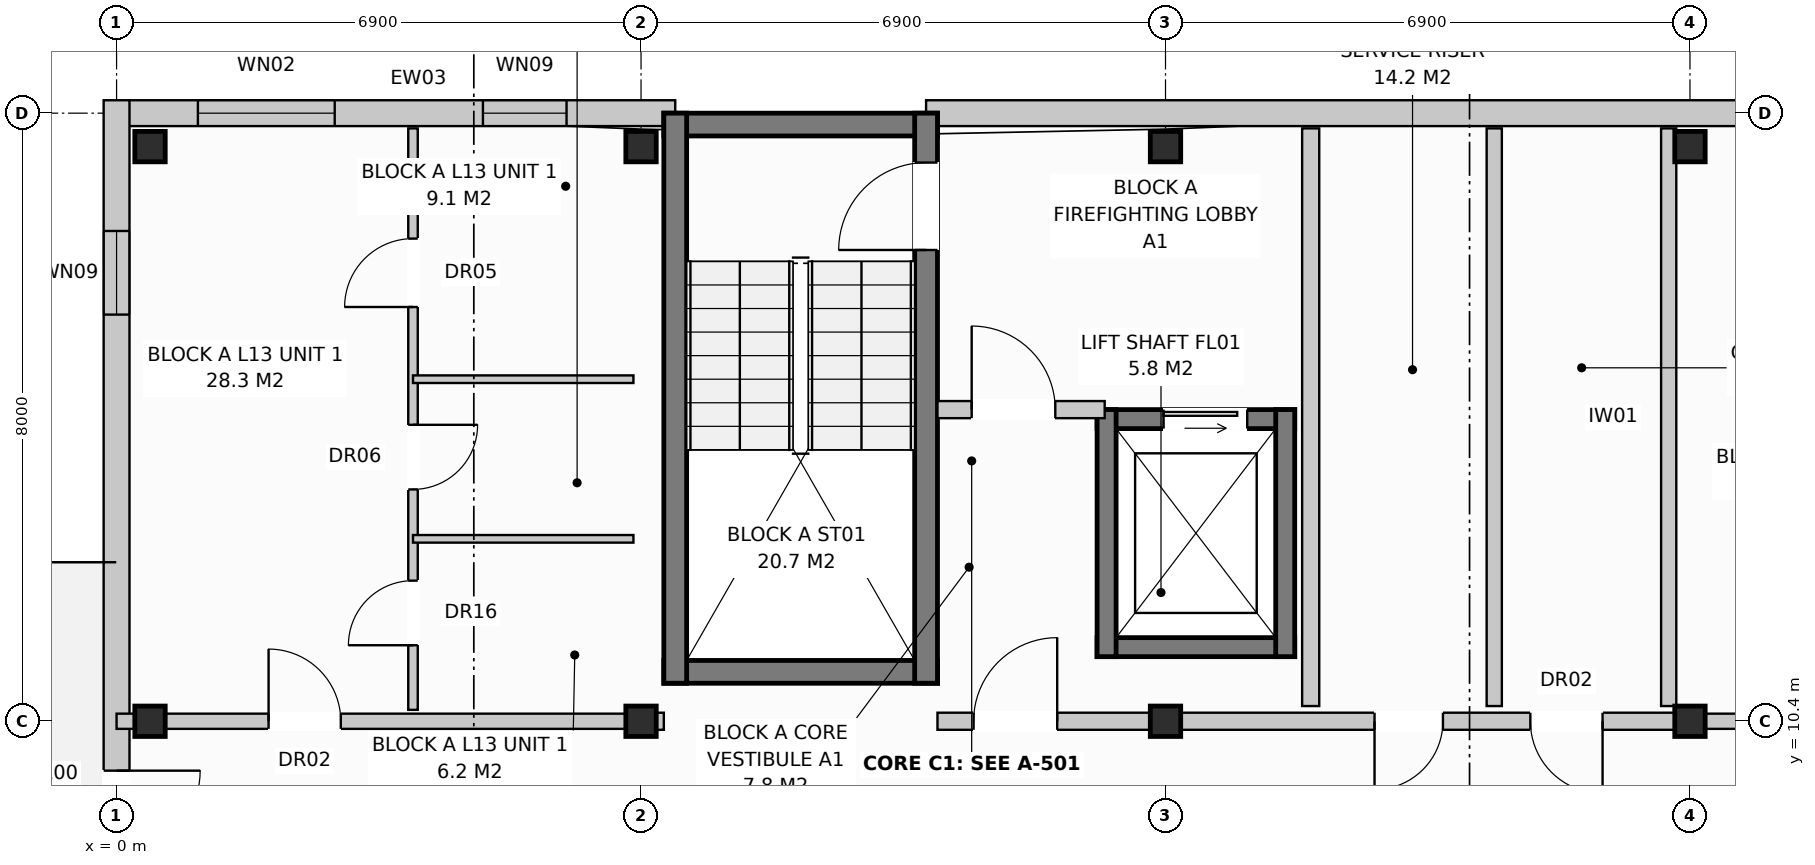
"""IFC4 building model, lengths in metres.
Left out: names, types, materials, properties, quantities, classifications, styles, units other than length and angle.
Written with IfcOpenShell. Run it as: python <this file> out.ifc"""

import sys

from ifc_helpers import new_model, si_unit, direction, frame, frame_2d, origin, origin_with_axes, origin_2d, place, context, subcontext, project, spatial, rectangle, extrude, element, fill, save


model = new_model("IFC4")
c1 = context("Model", 3, precision=1e-05, world=origin(), true_north=direction((0.0, 1.0)))
c2 = subcontext(c1, "Body", "Model", "MODEL_VIEW")
j1 = project(units=[si_unit("LENGTHUNIT", "METRE"), si_unit("PLANEANGLEUNIT", "RADIAN")], contexts=[c1])
p1 = place(None, origin())
s1 = spatial("IfcSite", under=j1, at=p1, CompositionType="ELEMENT")
p2 = place(p1, origin())
s2 = spatial("IfcBuilding", under=s1, at=p2, CompositionType="ELEMENT")
p3 = place(p2, frame((0.0, 0.0, 43.2)))
s3 = spatial("IfcBuildingStorey", under=s2, at=p3, CompositionType="ELEMENT", Elevation=43.2)
for number, where, z_axis, x_axis in (
    (1, (0.44, 10.4, 0.0), (0.0, 0.0, 1.0), (1.0, 0.0, 0.0)),
    (2, (0.44, 17.96, 0.0), (0.0, 0.0, 1.0), (1.0, 0.0, 0.0)),
    (3, (6.9, 10.4, 0.0), (0.0, 0.0, 1.0), (1.0, 0.0, 0.0)),
    (4, (6.9, 17.96, 0.0), (0.0, 0.0, 1.0), (1.0, 0.0, 0.0)),
    (5, (13.8, 10.4, 0.0), (0.0, 0.0, 1.0), (1.0, 0.0, 0.0)),
    (6, (13.8, 17.96, 0.0), (0.0, 0.0, 1.0), (1.0, 0.0, 0.0)),
    (7, (20.7, 10.4, 0.0), (0.0, 0.0, 1.0), (1.0, 0.0, 0.0)),
    (8, (20.7, 17.96, 0.0), (0.0, 0.0, 1.0), (1.0, 0.0, 0.0)),
):
    element("IfcColumn", number, at=place(p3, frame(where, z_axis=z_axis, x_axis=x_axis)), inside=s3, PredefinedType="COLUMN", context=c2, shape_type="SweptSolid", body=[
        extrude(rectangle(XDim=0.4, YDim=0.4, at=origin_2d()), origin(), (0.0, 0.0, 1.0), 3.2),
    ])
p4 = place(p3, frame((0.16, 18.4, 0.0), z_axis=(0.0, 0.0, 1.0), x_axis=(1.0, 0.0, 0.0)))
e9 = element("IfcWall", 9, at=p4, inside=s3, PredefinedType="STANDARD", context=c2, shape_type="SweptSolid", body=[
    extrude(rectangle(XDim=7.19, YDim=0.34, at=frame_2d((3.595, 0.0))), origin(), (0.0, 0.0, 1.0), 2.97),
])
p5 = place(p4, frame((0.91, 0.0, 0.8)))
e10 = element("IfcOpeningElement", 10, at=p5, cuts=e9, PredefinedType="OPENING", context=c2, shape_type="SweptSolid", body=[
    extrude(rectangle(XDim=1.8, YDim=1.7, at=frame_2d((0.9, 0.85))), frame((0.0, 0.182, 0.0), z_axis=(0.0, -1.0, 0.0), x_axis=(1.0, 0.0, 0.0)), (0.0, 0.0, 1.0), 0.364),
])
p6 = place(p4, frame((4.66, 0.0, 0.72)))
e11 = element("IfcOpeningElement", 11, at=p6, cuts=e9, PredefinedType="OPENING", context=c2, shape_type="SweptSolid", body=[
    extrude(rectangle(XDim=1.1, YDim=1.5, at=frame_2d((0.55, 0.75))), frame((0.0, 0.182, 0.0), z_axis=(0.0, -1.0, 0.0), x_axis=(1.0, 0.0, 0.0)), (0.0, 0.0, 1.0), 0.364),
])
p7 = place(p3, frame((10.65, 18.4, 0.0), z_axis=(0.0, 0.0, 1.0), x_axis=(1.0, 0.0, 0.0)))
e12 = element("IfcWall", 12, at=p7, inside=s3, PredefinedType="STANDARD", context=c2, shape_type="SweptSolid", body=[
    extrude(rectangle(XDim=17.4, YDim=0.34, at=frame_2d((8.7, 0.0))), origin(), (0.0, 0.0, 1.0), 2.97),
])
p8 = place(p7, frame((11.872, 0.0, 0.0)))
e13 = element("IfcOpeningElement", 13, at=p8, cuts=e12, PredefinedType="OPENING", context=c2, shape_type="SweptSolid", body=[
    extrude(rectangle(XDim=0.95, YDim=2.1, at=frame_2d((0.475, 1.05))), frame((0.0, 0.182, 0.0), z_axis=(0.0, -1.0, 0.0), x_axis=(1.0, 0.0, 0.0)), (0.0, 0.0, 1.0), 0.364),
])
p9 = place(p7, frame((14.97, 0.0, 0.72)))
e14 = element("IfcOpeningElement", 14, at=p9, cuts=e12, PredefinedType="OPENING", context=c2, shape_type="SweptSolid", body=[
    extrude(rectangle(XDim=1.1, YDim=1.5, at=frame_2d((0.55, 0.75))), frame((0.0, 0.182, 0.0), z_axis=(0.0, -1.0, 0.0), x_axis=(1.0, 0.0, 0.0)), (0.0, 0.0, 1.0), 0.364),
])
p10 = place(p3, frame((0.0, -0.17, 0.0), z_axis=(0.0, 0.0, 1.0), x_axis=(0.0, 1.0, 0.0)))
e15 = element("IfcWall", 15, at=p10, inside=s3, PredefinedType="STANDARD", context=c2, shape_type="SweptSolid", body=[
    extrude(rectangle(XDim=18.74, YDim=0.34, at=frame_2d((9.37, 0.0))), origin(), (0.0, 0.0, 1.0), 2.97),
])
p11 = place(p10, frame((8.82, 0.0, 0.0)))
e16 = element("IfcOpeningElement", 16, at=p11, cuts=e15, PredefinedType="OPENING", context=c2, shape_type="SweptSolid", body=[
    extrude(rectangle(XDim=1.1, YDim=2.1, at=frame_2d((0.55, 1.05))), frame((0.0, 0.182, 0.0), z_axis=(0.0, -1.0, 0.0), x_axis=(1.0, 0.0, 0.0)), (0.0, 0.0, 1.0), 0.364),
])
p12 = place(p10, frame((1.72, 0.0, 0.72)))
e17 = element("IfcOpeningElement", 17, at=p12, cuts=e15, PredefinedType="OPENING", context=c2, shape_type="SweptSolid", body=[
    extrude(rectangle(XDim=1.1, YDim=1.5, at=frame_2d((0.55, 0.75))), frame((0.0, 0.182, 0.0), z_axis=(0.0, -1.0, 0.0), x_axis=(1.0, 0.0, 0.0)), (0.0, 0.0, 1.0), 0.364),
])
p13 = place(p10, frame((15.92, 0.0, 0.72)))
e18 = element("IfcOpeningElement", 18, at=p13, cuts=e15, PredefinedType="OPENING", context=c2, shape_type="SweptSolid", body=[
    extrude(rectangle(XDim=1.1, YDim=1.5, at=frame_2d((0.55, 0.75))), frame((0.0, 0.182, 0.0), z_axis=(0.0, -1.0, 0.0), x_axis=(1.0, 0.0, 0.0)), (0.0, 0.0, 1.0), 0.364),
])
for number, where, z_axis, x_axis in (
    (19, (7.2, 18.25, 0.0), (0.0, 0.0, 1.0), (1.0, 0.0, 0.0)),
    (20, (7.2, 11.05, 0.0), (0.0, 0.0, 1.0), (1.0, 0.0, 0.0)),
):
    element("IfcWall", number, at=place(p3, frame(where, z_axis=z_axis, x_axis=x_axis)), inside=s3, PredefinedType="SHEAR", context=c2, shape_type="SweptSolid", body=[
        extrude(rectangle(XDim=3.6, YDim=0.3, at=frame_2d((1.8, 0.0))), origin(), (0.0, 0.0, 1.0), 2.97),
    ])
p14 = place(p3, frame((7.35, 10.9, 0.0), z_axis=(0.0, 0.0, 1.0), x_axis=(0.0, 1.0, 0.0)))
e21 = element("IfcWall", 21, at=p14, inside=s3, PredefinedType="SHEAR", context=c2, shape_type="SweptSolid", body=[
    extrude(rectangle(XDim=7.5, YDim=0.3, at=frame_2d((3.75, 0.0))), origin(), (0.0, 0.0, 1.0), 2.97),
])
p15 = place(p3, frame((10.65, 10.9, 0.0), z_axis=(0.0, 0.0, 1.0), x_axis=(0.0, 1.0, 0.0)))
e22 = element("IfcWall", 22, at=p15, inside=s3, PredefinedType="SHEAR", context=c2, shape_type="SweptSolid", body=[
    extrude(rectangle(XDim=7.5, YDim=0.3, at=frame_2d((3.75, 0.0))), origin(), (0.0, 0.0, 1.0), 2.97),
])
p16 = place(p15, frame((5.7, 0.0, 0.0)))
e23 = element("IfcOpeningElement", 23, at=p16, cuts=e22, PredefinedType="OPENING", context=c2, shape_type="SweptSolid", body=[
    extrude(rectangle(XDim=1.15, YDim=2.15, at=frame_2d((0.575, 1.075))), frame((0.0, 0.162, 0.0), z_axis=(0.0, -1.0, 0.0), x_axis=(1.0, 0.0, 0.0)), (0.0, 0.0, 1.0), 0.324),
])
p17 = place(p3, frame((12.9, 14.375, 0.0), z_axis=(0.0, 0.0, 1.0), x_axis=(1.0, 0.0, 0.0)))
e24 = element("IfcWall", 24, at=p17, inside=s3, PredefinedType="SHEAR", context=c2, shape_type="SweptSolid", body=[
    extrude(rectangle(XDim=2.6, YDim=0.25, at=frame_2d((1.3, 0.0))), origin(), (0.0, 0.0, 1.0), 2.97),
])
p18 = place(p17, frame((0.875, 0.0, 0.0)))
e25 = element("IfcOpeningElement", 25, at=p18, cuts=e24, PredefinedType="OPENING", context=c2, shape_type="SweptSolid", body=[
    extrude(rectangle(XDim=1.1, YDim=2.1, at=frame_2d((0.55, 1.05))), frame((0.0, 0.137, 0.0), z_axis=(0.0, -1.0, 0.0), x_axis=(1.0, 0.0, 0.0)), (0.0, 0.0, 1.0), 0.274),
])
p19 = place(p3, frame((12.9, 11.375, 0.0), z_axis=(0.0, 0.0, 1.0), x_axis=(1.0, 0.0, 0.0)))
e26 = element("IfcWall", 26, at=p19, inside=s3, PredefinedType="SHEAR", context=c2, shape_type="SweptSolid", body=[
    extrude(rectangle(XDim=2.6, YDim=0.25, at=frame_2d((1.3, 0.0))), origin(), (0.0, 0.0, 1.0), 2.97),
])
for number, where, z_axis, x_axis in (
    (27, (13.025, 11.25, 0.0), (0.0, 0.0, 1.0), (0.0, 1.0, 0.0)),
    (28, (15.375, 11.25, 0.0), (0.0, 0.0, 1.0), (0.0, 1.0, 0.0)),
):
    element("IfcWall", number, at=place(p3, frame(where, z_axis=z_axis, x_axis=x_axis)), inside=s3, PredefinedType="SHEAR", context=c2, shape_type="SweptSolid", body=[
        extrude(rectangle(XDim=3.25, YDim=0.25, at=frame_2d((1.625, 0.0))), origin(), (0.0, 0.0, 1.0), 2.97),
    ])
p20 = place(p3, frame((15.71, 10.6, 0.0), z_axis=(0.0, 0.0, 1.0), x_axis=(0.0, 1.0, 0.0)))
e29 = element("IfcWall", 29, at=p20, inside=s3, PredefinedType="PARTITIONING", context=c2, shape_type="SweptSolid", body=[
    extrude(rectangle(XDim=7.6, YDim=0.225, at=frame_2d((3.8, 0.0))), origin(), (0.0, 0.0, 1.0), 2.59),
])
p21 = place(p3, frame((10.8, 14.5, 0.0), z_axis=(0.0, 0.0, 1.0), x_axis=(1.0, 0.0, 0.0)))
e30 = element("IfcWall", 30, at=p21, inside=s3, PredefinedType="PARTITIONING", context=c2, shape_type="SweptSolid", body=[
    extrude(rectangle(XDim=2.2, YDim=0.225, at=frame_2d((1.1, 0.0))), origin(), (0.0, 0.0, 1.0), 2.97),
])
p22 = place(p21, frame((0.45, 0.0, 0.0)))
e31 = element("IfcOpeningElement", 31, at=p22, cuts=e30, PredefinedType="OPENING", context=c2, shape_type="SweptSolid", body=[
    extrude(rectangle(XDim=1.1, YDim=2.15, at=frame_2d((0.55, 1.075))), frame((0.0, 0.125, 0.0), z_axis=(0.0, -1.0, 0.0), x_axis=(1.0, 0.0, 0.0)), (0.0, 0.0, 1.0), 0.249),
])
p23 = place(p3, frame((6.9, 10.4, 0.0), z_axis=(0.0, 0.0, 1.0), x_axis=(1.0, 0.0, 0.0)))
e32 = element("IfcWall", 32, at=p23, inside=s3, PredefinedType="PARTITIONING", context=c2, shape_type="SweptSolid", body=[
    extrude(rectangle(XDim=0.3, YDim=0.225, at=frame_2d((0.15, 0.0))), origin(), (0.0, 0.0, 1.0), 2.97),
])
p24 = place(p3, frame((18.125, 10.6, 0.0), z_axis=(0.0, 0.0, 1.0), x_axis=(0.0, 1.0, 0.0)))
e33 = element("IfcWall", 33, at=p24, inside=s3, PredefinedType="PARTITIONING", context=c2, shape_type="SweptSolid", body=[
    extrude(rectangle(XDim=7.6, YDim=0.2, at=frame_2d((3.8, 0.0))), origin(), (0.0, 0.0, 1.0), 2.59),
])
p25 = place(p3, frame((20.42, 10.6, 0.0), z_axis=(0.0, 0.0, 1.0), x_axis=(0.0, 1.0, 0.0)))
e34 = element("IfcWall", 34, at=p25, inside=s3, PredefinedType="PARTITIONING", context=c2, shape_type="SweptSolid", body=[
    extrude(rectangle(XDim=7.6, YDim=0.2, at=frame_2d((3.8, 0.0))), origin(), (0.0, 0.0, 1.0), 2.97),
])
p26 = place(p3, frame((10.8, 10.4, 0.0), z_axis=(0.0, 0.0, 1.0), x_axis=(1.0, 0.0, 0.0)))
e35 = element("IfcWall", 35, at=p26, inside=s3, PredefinedType="PARTITIONING", context=c2, shape_type="SweptSolid", body=[
    extrude(rectangle(XDim=9.9, YDim=0.225, at=frame_2d((4.95, 0.0))), origin(), (0.0, 0.0, 1.0), 2.41),
])
p27 = place(p26, frame((0.475, 0.0, 0.0)))
e36 = element("IfcOpeningElement", 36, at=p27, cuts=e35, PredefinedType="OPENING", context=c2, shape_type="SweptSolid", body=[
    extrude(rectangle(XDim=1.1, YDim=2.15, at=frame_2d((0.55, 1.075))), frame((0.0, 0.125, 0.0), z_axis=(0.0, -1.0, 0.0), x_axis=(1.0, 0.0, 0.0)), (0.0, 0.0, 1.0), 0.249),
])
p28 = place(p26, frame((5.75, 0.0, 0.0)))
e37 = element("IfcOpeningElement", 37, at=p28, cuts=e35, PredefinedType="OPENING", context=c2, shape_type="SweptSolid", body=[
    extrude(rectangle(XDim=0.9, YDim=2.1, at=frame_2d((0.45, 1.05))), frame((0.0, 0.125, 0.0), z_axis=(0.0, -1.0, 0.0), x_axis=(1.0, 0.0, 0.0)), (0.0, 0.0, 1.0), 0.249),
])
p29 = place(p26, frame((7.8, 0.0, 0.0)))
e38 = element("IfcOpeningElement", 38, at=p29, cuts=e35, PredefinedType="OPENING", context=c2, shape_type="SweptSolid", body=[
    extrude(rectangle(XDim=0.95, YDim=2.15, at=frame_2d((0.475, 1.075))), frame((0.0, 0.125, 0.0), z_axis=(0.0, -1.0, 0.0), x_axis=(1.0, 0.0, 0.0)), (0.0, 0.0, 1.0), 0.249),
])
p30 = place(p3, frame((0.0, 10.4, 0.0), z_axis=(0.0, 0.0, 1.0), x_axis=(1.0, 0.0, 0.0)))
e39 = element("IfcWall", 39, at=p30, inside=s3, PredefinedType="PARTITIONING", context=c2, shape_type="SweptSolid", body=[
    extrude(rectangle(XDim=6.9, YDim=0.2, at=frame_2d((3.45, 0.0))), origin(), (0.0, 0.0, 1.0), 2.41),
])
p31 = place(p30, frame((2.0, 0.0, 0.0)))
e40 = element("IfcOpeningElement", 40, at=p31, cuts=e39, PredefinedType="OPENING", context=c2, shape_type="SweptSolid", body=[
    extrude(rectangle(XDim=0.95, YDim=2.15, at=frame_2d((0.475, 1.075))), frame((0.0, 0.112, 0.0), z_axis=(0.0, -1.0, 0.0), x_axis=(1.0, 0.0, 0.0)), (0.0, 0.0, 1.0), 0.224),
])
p32 = place(p3, frame((3.9, 10.55, 0.0), z_axis=(0.0, 0.0, 1.0), x_axis=(0.0, 1.0, 0.0)))
e41 = element("IfcWall", 41, at=p32, inside=s3, PredefinedType="PARTITIONING", context=c2, shape_type="SweptSolid", body=[
    extrude(rectangle(XDim=7.65, YDim=0.125, at=frame_2d((3.825, 0.0))), origin(), (0.0, 0.0, 1.0), 2.97),
])
p33 = place(p32, frame((0.85, 0.0, 0.0)))
e42 = element("IfcOpeningElement", 42, at=p33, cuts=e41, PredefinedType="OPENING", context=c2, shape_type="SweptSolid", body=[
    extrude(rectangle(XDim=0.85, YDim=2.1, at=frame_2d((0.425, 1.05))), frame((0.0, 0.074, 0.0), z_axis=(0.0, -1.0, 0.0), x_axis=(1.0, 0.0, 0.0)), (0.0, 0.0, 1.0), 0.149),
])
p34 = place(p32, frame((2.9, 0.0, 0.0)))
e43 = element("IfcOpeningElement", 43, at=p34, cuts=e41, PredefinedType="OPENING", context=c2, shape_type="SweptSolid", body=[
    extrude(rectangle(XDim=0.85, YDim=2.05, at=frame_2d((0.425, 1.025))), frame((0.0, 0.074, 0.0), z_axis=(0.0, -1.0, 0.0), x_axis=(1.0, 0.0, 0.0)), (0.0, 0.0, 1.0), 0.149),
])
p35 = place(p32, frame((5.3, 0.0, 0.0)))
e44 = element("IfcOpeningElement", 44, at=p35, cuts=e41, PredefinedType="OPENING", context=c2, shape_type="SweptSolid", body=[
    extrude(rectangle(XDim=0.9, YDim=2.1, at=frame_2d((0.45, 1.05))), frame((0.0, 0.074, 0.0), z_axis=(0.0, -1.0, 0.0), x_axis=(1.0, 0.0, 0.0)), (0.0, 0.0, 1.0), 0.149),
])
for number, where, z_axis, x_axis in (
    (45, (3.9, 12.8, 0.0), (0.0, 0.0, 1.0), (1.0, 0.0, 0.0)),
    (46, (3.9, 14.9, 0.0), (0.0, 0.0, 1.0), (1.0, 0.0, 0.0)),
):
    element("IfcWall", number, at=place(p3, frame(where, z_axis=z_axis, x_axis=x_axis)), inside=s3, PredefinedType="PARTITIONING", context=c2, shape_type="SweptSolid", body=[
        extrude(rectangle(XDim=2.9, YDim=0.1, at=frame_2d((1.45, 0.0))), origin(), (0.0, 0.0, 1.0), 2.97),
    ])
p36 = place(p3, frame((20.7, 10.4, 0.0), z_axis=(0.0, 0.0, 1.0), x_axis=(1.0, 0.0, 0.0)))
e47 = element("IfcWall", 47, at=p36, inside=s3, PredefinedType="PARTITIONING", context=c2, shape_type="SweptSolid", body=[
    extrude(rectangle(XDim=6.9, YDim=0.2, at=frame_2d((3.45, 0.0))), origin(), (0.0, 0.0, 1.0), 2.41),
])
p37 = place(p36, frame((2.0, 0.0, 0.0)))
e48 = element("IfcOpeningElement", 48, at=p37, cuts=e47, PredefinedType="OPENING", context=c2, shape_type="SweptSolid", body=[
    extrude(rectangle(XDim=0.95, YDim=2.15, at=frame_2d((0.475, 1.075))), frame((0.0, 0.112, 0.0), z_axis=(0.0, -1.0, 0.0), x_axis=(1.0, 0.0, 0.0)), (0.0, 0.0, 1.0), 0.224),
])
p38 = place(p5, origin_with_axes())
e49 = element("IfcWindow", 49, at=p38, inside=s3, PartitioningType="SINGLE_PANEL", PredefinedType="WINDOW", context=c2, shape_type="SweptSolid", body=[
    extrude(rectangle(XDim=1.8, YDim=1.7, at=frame_2d((0.9, 0.85))), frame((0.0, 0.03, 0.0), z_axis=(0.0, -1.0, 0.0), x_axis=(1.0, 0.0, 0.0)), (0.0, 0.0, 1.0), 0.06),
])
fill(e10, e49)
p39 = place(p6, origin_with_axes())
e50 = element("IfcWindow", 50, at=p39, inside=s3, PartitioningType="SINGLE_PANEL", PredefinedType="WINDOW", context=c2, shape_type="SweptSolid", body=[
    extrude(rectangle(XDim=1.1, YDim=1.5, at=frame_2d((0.55, 0.75))), frame((0.0, 0.03, 0.0), z_axis=(0.0, -1.0, 0.0), x_axis=(1.0, 0.0, 0.0)), (0.0, 0.0, 1.0), 0.06),
])
fill(e11, e50)
p40 = place(p11, frame((1.1, 0.0, 0.0), z_axis=(0.0, 0.0, 1.0), x_axis=(-1.0, 0.0, 0.0)))
e51 = element("IfcDoor", 51, at=p40, inside=s3, OperationType="SINGLE_SWING_RIGHT", PredefinedType="DOOR", context=c2, shape_type="SweptSolid", body=[
    extrude(rectangle(XDim=1.1, YDim=2.1, at=frame_2d((0.55, 1.05))), frame((0.0, 0.025, 0.0), z_axis=(0.0, -1.0, 0.0), x_axis=(1.0, 0.0, 0.0)), (0.0, 0.0, 1.0), 0.05),
])
fill(e16, e51)
p41 = place(p13, origin_with_axes())
e52 = element("IfcWindow", 52, at=p41, inside=s3, PartitioningType="SINGLE_PANEL", PredefinedType="WINDOW", context=c2, shape_type="SweptSolid", body=[
    extrude(rectangle(XDim=1.1, YDim=1.5, at=frame_2d((0.55, 0.75))), frame((0.0, 0.03, 0.0), z_axis=(0.0, -1.0, 0.0), x_axis=(1.0, 0.0, 0.0)), (0.0, 0.0, 1.0), 0.06),
])
fill(e18, e52)
p42 = place(p16, origin_with_axes())
e53 = element("IfcDoor", 53, at=p42, inside=s3, OperationType="SINGLE_SWING_LEFT", PredefinedType="DOOR", context=c2, shape_type="SweptSolid", body=[
    extrude(rectangle(XDim=1.15, YDim=2.15, at=frame_2d((0.575, 1.075))), frame((0.0, 0.025, 0.0), z_axis=(0.0, -1.0, 0.0), x_axis=(1.0, 0.0, 0.0)), (0.0, 0.0, 1.0), 0.05),
])
fill(e23, e53)
p43 = place(p18, origin_with_axes())
e54 = element("IfcDoor", 54, at=p43, inside=s3, OperationType="SLIDING_TO_LEFT", PredefinedType="DOOR", context=c2, shape_type="SweptSolid", body=[
    extrude(rectangle(XDim=1.1, YDim=2.1, at=frame_2d((0.55, 1.05))), frame((0.0, 0.025, 0.0), z_axis=(0.0, -1.0, 0.0), x_axis=(1.0, 0.0, 0.0)), (0.0, 0.0, 1.0), 0.05),
])
fill(e25, e54)
p44 = place(p22, origin_with_axes())
e55 = element("IfcDoor", 55, at=p44, inside=s3, OperationType="SINGLE_SWING_LEFT", PredefinedType="DOOR", context=c2, shape_type="SweptSolid", body=[
    extrude(rectangle(XDim=1.1, YDim=2.15, at=frame_2d((0.55, 1.075))), frame((0.0, 0.025, 0.0), z_axis=(0.0, -1.0, 0.0), x_axis=(1.0, 0.0, 0.0)), (0.0, 0.0, 1.0), 0.05),
])
fill(e31, e55)
p45 = place(p27, origin_with_axes())
e56 = element("IfcDoor", 56, at=p45, inside=s3, OperationType="SINGLE_SWING_RIGHT", PredefinedType="DOOR", context=c2, shape_type="SweptSolid", body=[
    extrude(rectangle(XDim=1.1, YDim=2.15, at=frame_2d((0.55, 1.075))), frame((0.0, 0.025, 0.0), z_axis=(0.0, -1.0, 0.0), x_axis=(1.0, 0.0, 0.0)), (0.0, 0.0, 1.0), 0.05),
])
fill(e36, e56)
p46 = place(p28, frame((0.9, 0.0, 0.0), z_axis=(0.0, 0.0, 1.0), x_axis=(-1.0, 0.0, 0.0)))
e57 = element("IfcDoor", 57, at=p46, inside=s3, OperationType="SINGLE_SWING_LEFT", PredefinedType="DOOR", context=c2, shape_type="SweptSolid", body=[
    extrude(rectangle(XDim=0.9, YDim=2.1, at=frame_2d((0.45, 1.05))), frame((0.0, 0.025, 0.0), z_axis=(0.0, -1.0, 0.0), x_axis=(1.0, 0.0, 0.0)), (0.0, 0.0, 1.0), 0.05),
])
fill(e37, e57)
p47 = place(p29, frame((0.95, 0.0, 0.0), z_axis=(0.0, 0.0, 1.0), x_axis=(-1.0, 0.0, 0.0)))
e58 = element("IfcDoor", 58, at=p47, inside=s3, OperationType="SINGLE_SWING_RIGHT", PredefinedType="DOOR", context=c2, shape_type="SweptSolid", body=[
    extrude(rectangle(XDim=0.95, YDim=2.15, at=frame_2d((0.475, 1.075))), frame((0.0, 0.025, 0.0), z_axis=(0.0, -1.0, 0.0), x_axis=(1.0, 0.0, 0.0)), (0.0, 0.0, 1.0), 0.05),
])
fill(e38, e58)
p48 = place(p31, origin_with_axes())
e59 = element("IfcDoor", 59, at=p48, inside=s3, OperationType="SINGLE_SWING_LEFT", PredefinedType="DOOR", context=c2, shape_type="SweptSolid", body=[
    extrude(rectangle(XDim=0.95, YDim=2.15, at=frame_2d((0.475, 1.075))), frame((0.0, 0.025, 0.0), z_axis=(0.0, -1.0, 0.0), x_axis=(1.0, 0.0, 0.0)), (0.0, 0.0, 1.0), 0.05),
])
fill(e40, e59)
p49 = place(p33, origin_with_axes())
e60 = element("IfcDoor", 60, at=p49, inside=s3, OperationType="SINGLE_SWING_LEFT", PredefinedType="DOOR", context=c2, shape_type="SweptSolid", body=[
    extrude(rectangle(XDim=0.85, YDim=2.1, at=frame_2d((0.425, 1.05))), frame((0.0, 0.025, 0.0), z_axis=(0.0, -1.0, 0.0), x_axis=(1.0, 0.0, 0.0)), (0.0, 0.0, 1.0), 0.05),
])
fill(e42, e60)
p50 = place(p34, frame((0.85, 0.0, 0.0), z_axis=(0.0, 0.0, 1.0), x_axis=(-1.0, 0.0, 0.0)))
e61 = element("IfcDoor", 61, at=p50, inside=s3, OperationType="SINGLE_SWING_RIGHT", PredefinedType="DOOR", context=c2, shape_type="SweptSolid", body=[
    extrude(rectangle(XDim=0.85, YDim=2.05, at=frame_2d((0.425, 1.025))), frame((0.0, 0.025, 0.0), z_axis=(0.0, -1.0, 0.0), x_axis=(1.0, 0.0, 0.0)), (0.0, 0.0, 1.0), 0.05),
])
fill(e43, e61)
p51 = place(p35, origin_with_axes())
e62 = element("IfcDoor", 62, at=p51, inside=s3, OperationType="SINGLE_SWING_LEFT", PredefinedType="DOOR", context=c2, shape_type="SweptSolid", body=[
    extrude(rectangle(XDim=0.9, YDim=2.1, at=frame_2d((0.45, 1.05))), frame((0.0, 0.025, 0.0), z_axis=(0.0, -1.0, 0.0), x_axis=(1.0, 0.0, 0.0)), (0.0, 0.0, 1.0), 0.05),
])
fill(e44, e62)
save(model, sys.argv[1])
